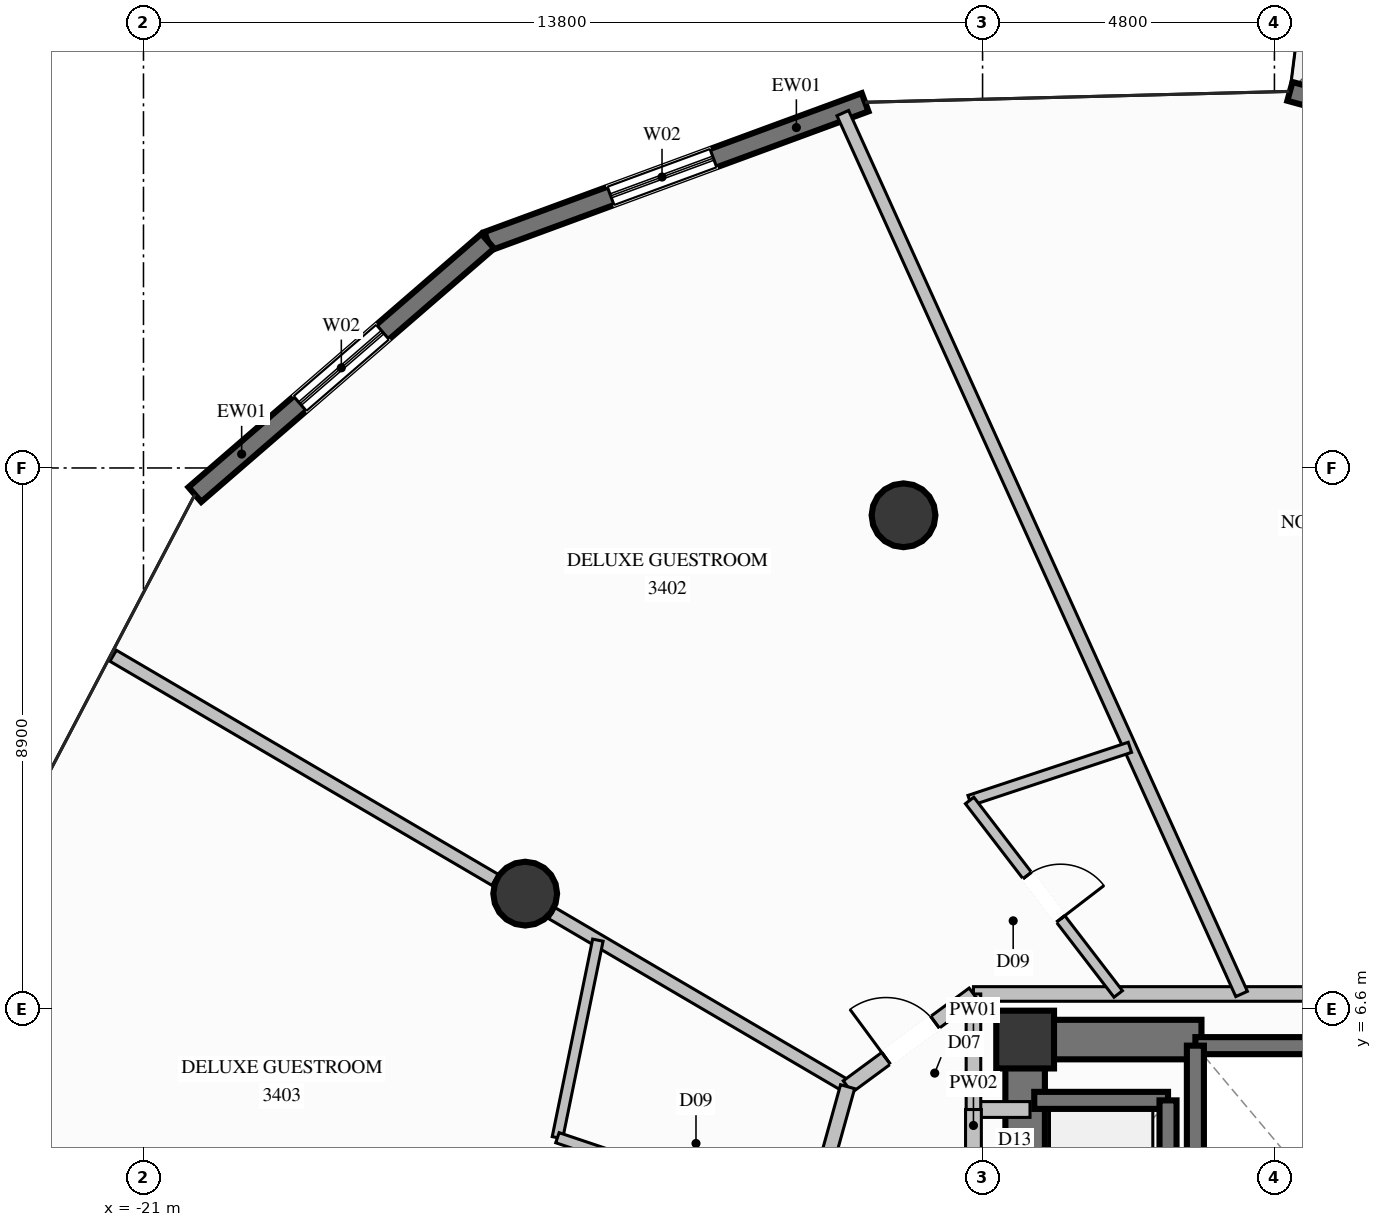
"""IFC4 building model, lengths in metres.
Left out: names, types, materials, properties, quantities, classifications, styles, units other than length and angle.
Written with IfcOpenShell. Run it as: python <this file> out.ifc"""

import sys

from ifc_helpers import new_model, si_unit, direction, frame, frame_2d, origin, origin_2d, place, context, subcontext, project, spatial, rectangle, circle, extrude, element, fill, save


model = new_model("IFC4")
c1 = context("Model", 3, precision=1e-05, world=origin(), true_north=direction((0.0, 1.0)))
c2 = subcontext(c1, "Body", "Model", "MODEL_VIEW")
j1 = project(units=[si_unit("LENGTHUNIT", "METRE"), si_unit("PLANEANGLEUNIT", "RADIAN")], contexts=[c1])
p1 = place(None, origin())
s1 = spatial("IfcSite", under=j1, at=p1, CompositionType="ELEMENT")
p2 = place(p1, origin())
s2 = spatial("IfcBuilding", under=s1, at=p2, CompositionType="ELEMENT")
p3 = place(p2, frame((0.0, 0.0, 127.8)))
s3 = spatial("IfcBuildingStorey", under=s2, at=p3, CompositionType="ELEMENT", Elevation=127.8)
p4 = place(p3, frame((-6.5, 6.1, 0.0), z_axis=(0.0, 0.0, 1.0), x_axis=(1.0, 0.0, 0.0)))
e1 = element("IfcColumn", 1, at=p4, inside=s3, PredefinedType="COLUMN", context=c2, shape_type="SweptSolid", body=[
    extrude(rectangle(XDim=0.95, YDim=0.95, at=origin_2d()), origin(), (0.0, 0.0, 1.0), 3.6),
])
p5 = place(p3, frame((-6.175, 6.1, 0.0), z_axis=(0.0, 0.0, 1.0), x_axis=(1.0, 0.0, 0.0)))
e2 = element("IfcWall", 2, at=p5, inside=s3, PredefinedType="SHEAR", context=c2, shape_type="SweptSolid", body=[
    extrude(rectangle(XDim=2.575, YDim=0.65, at=frame_2d((1.288, 0.0))), origin(), (0.0, 0.0, 1.0), 3.6),
])
p6 = place(p3, frame((-6.5, 2.35, 0.0), z_axis=(0.0, 0.0, 1.0), x_axis=(0.0, 1.0, 0.0)))
e3 = element("IfcWall", 3, at=p6, inside=s3, PredefinedType="SHEAR", context=c2, shape_type="SweptSolid", body=[
    extrude(rectangle(XDim=4.075, YDim=0.65, at=frame_2d((2.038, 0.0))), origin(), (0.0, 0.0, 1.0), 3.6),
])
for number, where, z_axis, x_axis in (
    (4, (-8.5, 14.722, 0.0), (0.0, 0.0, 1.0), (1.0, 0.0, 0.0)),
    (5, (-14.722, 8.5, 0.0), (0.0, 0.0, 1.0), (1.0, 0.0, 0.0)),
):
    element("IfcColumn", number, at=place(p3, frame(where, z_axis=z_axis, x_axis=x_axis)), inside=s3, PredefinedType="COLUMN", context=c2, shape_type="SweptSolid", body=[
        extrude(circle(Radius=0.525, at=origin_2d()), origin(), (0.0, 0.0, 1.0), 3.6),
    ])
p7 = place(p3, frame((-2.145, 21.693, 0.0), z_axis=(0.0, 0.0, 1.0), x_axis=(0.964319993606, -0.264739400036, 0.0)))
e6 = element("IfcWall", 6, at=p7, inside=s3, PredefinedType="SOLIDWALL", context=c2, shape_type="SweptSolid", body=[
    extrude(rectangle(XDim=7.347, YDim=0.32, at=frame_2d((3.674, 0.0))), origin(), (0.0, 0.0, 1.0), 3.35),
])
p8 = place(p7, frame((2.774, 0.0, 0.35)))
e7 = element("IfcOpeningElement", 7, at=p8, cuts=e6, PredefinedType="OPENING", context=c2, shape_type="SweptSolid", body=[
    extrude(rectangle(XDim=1.8, YDim=2.6, at=frame_2d((0.9, 1.3))), frame((0.0, 0.17, 0.0), z_axis=(0.0, -1.0, 0.0), x_axis=(1.0, 0.0, 0.0)), (0.0, 0.0, 1.0), 0.34),
])
p9 = place(p3, frame((-15.338, 19.23, 0.0), z_axis=(0.0, 0.0, 1.0), x_axis=(0.938461564884, 0.345383686986, 0.0)))
e8 = element("IfcWall", 8, at=p9, inside=s3, PredefinedType="SOLIDWALL", context=c2, shape_type="SweptSolid", body=[
    extrude(rectangle(XDim=6.613, YDim=0.32, at=frame_2d((3.306, 0.0))), origin(), (0.0, 0.0, 1.0), 3.35),
])
p10 = place(p9, frame((2.154, 0.0, 0.35)))
e9 = element("IfcOpeningElement", 9, at=p10, cuts=e8, PredefinedType="OPENING", context=c2, shape_type="SweptSolid", body=[
    extrude(rectangle(XDim=1.8, YDim=2.6, at=frame_2d((0.9, 1.3))), frame((0.0, 0.17, 0.0), z_axis=(0.0, -1.0, 0.0), x_axis=(1.0, 0.0, 0.0)), (0.0, 0.0, 1.0), 0.34),
])
p11 = place(p3, frame((-20.155, 15.063, 0.0), z_axis=(0.0, 0.0, 1.0), x_axis=(0.756299610366, 0.654225419377, 0.0)))
e10 = element("IfcWall", 10, at=p11, inside=s3, PredefinedType="SOLIDWALL", context=c2, shape_type="SweptSolid", body=[
    extrude(rectangle(XDim=6.369, YDim=0.32, at=frame_2d((3.185, 0.0))), origin(), (0.0, 0.0, 1.0), 3.35),
])
p12 = place(p11, frame((2.285, 0.0, 0.35)))
e11 = element("IfcOpeningElement", 11, at=p12, cuts=e10, PredefinedType="OPENING", context=c2, shape_type="SweptSolid", body=[
    extrude(rectangle(XDim=1.8, YDim=2.6, at=frame_2d((0.9, 1.3))), frame((0.0, 0.17, 0.0), z_axis=(0.0, -1.0, 0.0), x_axis=(1.0, 0.0, 0.0)), (0.0, 0.0, 1.0), 0.34),
])
p13 = place(p3, frame((-1.6, 6.0, 0.0), z_axis=(0.0, 0.0, 1.0), x_axis=(-1.0, 0.0, 0.0)))
e12 = element("IfcWall", 12, at=p13, inside=s3, PredefinedType="SOLIDWALL", context=c2, shape_type="SweptSolid", body=[
    extrude(rectangle(XDim=2.1, YDim=0.28, at=frame_2d((1.05, 0.0))), origin(), (0.0, 0.0, 1.0), 3.35),
])
p14 = place(p3, frame((-3.7, 6.0, 0.0), z_axis=(0.0, 0.0, 1.0), x_axis=(0.0, -1.0, 0.0)))
e13 = element("IfcWall", 13, at=p14, inside=s3, PredefinedType="SOLIDWALL", context=c2, shape_type="SweptSolid", body=[
    extrude(rectangle(XDim=2.5, YDim=0.28, at=frame_2d((1.25, 0.0))), origin(), (0.0, 0.0, 1.0), 3.35),
])
p15 = place(p3, frame((-4.15, 5.1, 0.0), z_axis=(0.0, 0.0, 1.0), x_axis=(-1.0, 0.0, 0.0)))
e14 = element("IfcWall", 14, at=p15, inside=s3, PredefinedType="SOLIDWALL", context=c2, shape_type="SweptSolid", body=[
    extrude(rectangle(XDim=2.2, YDim=0.28, at=frame_2d((1.1, 0.0))), origin(), (0.0, 0.0, 1.0), 3.35),
])
p16 = place(p3, frame((-4.15, 2.4, 0.0), z_axis=(0.0, 0.0, 1.0), x_axis=(0.0, 1.0, 0.0)))
e15 = element("IfcWall", 15, at=p16, inside=s3, PredefinedType="SOLIDWALL", context=c2, shape_type="SweptSolid", body=[
    extrude(rectangle(XDim=2.7, YDim=0.28, at=frame_2d((1.35, 0.0))), origin(), (0.0, 0.0, 1.0), 3.35),
])
p17 = place(p3, frame((-7.35, 4.95, 0.0), z_axis=(0.0, 0.0, 1.0), x_axis=(1.0, 0.0, 0.0)))
e16 = element("IfcWall", 16, at=p17, inside=s3, PredefinedType="PARTITIONING", context=c2, shape_type="SweptSolid", body=[
    extrude(rectangle(XDim=0.93, YDim=0.26, at=frame_2d((0.465, 0.0))), origin(), (0.0, 0.0, 1.0), 3.35),
])
p18 = place(p3, frame((-7.35, 2.55, 0.0), z_axis=(0.0, 0.0, 1.0), x_axis=(0.0, 1.0, 0.0)))
e17 = element("IfcWall", 17, at=p18, inside=s3, PredefinedType="PARTITIONING", context=c2, shape_type="SweptSolid", body=[
    extrude(rectangle(XDim=2.4, YDim=0.26, at=frame_2d((1.2, 0.0))), origin(), (0.0, 0.0, 1.0), 2.435),
])
p19 = place(p18, frame((0.775, 0.0, 0.0)))
e18 = element("IfcOpeningElement", 18, at=p19, cuts=e17, PredefinedType="OPENING", context=c2, shape_type="SweptSolid", body=[
    extrude(rectangle(XDim=0.85, YDim=2.05, at=frame_2d((0.425, 1.025))), frame((0.0, 0.14, 0.0), z_axis=(0.0, -1.0, 0.0), x_axis=(1.0, 0.0, 0.0)), (0.0, 0.0, 1.0), 0.28),
])
p20 = place(p3, frame((-7.35, 6.85, 0.0), z_axis=(0.0, 0.0, 1.0), x_axis=(1.0, 0.0, 0.0)))
e19 = element("IfcWall", 19, at=p20, inside=s3, PredefinedType="PARTITIONING", context=c2, shape_type="SweptSolid", body=[
    extrude(rectangle(XDim=14.7, YDim=0.24, at=frame_2d((7.35, 0.0))), origin(), (0.0, 0.0, 1.0), 2.435),
])
p21 = place(p3, frame((-7.35, 4.95, 0.0), z_axis=(0.0, 0.0, 1.0), x_axis=(0.0, 1.0, 0.0)))
e20 = element("IfcWall", 20, at=p21, inside=s3, PredefinedType="PARTITIONING", context=c2, shape_type="SweptSolid", body=[
    extrude(rectangle(XDim=1.9, YDim=0.24, at=frame_2d((0.95, 0.0))), origin(), (0.0, 0.0, 1.0), 2.435),
])
p22 = place(p3, frame((-9.42, 5.325, 0.0), z_axis=(0.0, 0.0, 1.0), x_axis=(-0.862477017481, 0.506096230293, 0.0)))
e21 = element("IfcWall", 21, at=p22, inside=s3, PredefinedType="PARTITIONING", context=c2, shape_type="SweptSolid", body=[
    extrude(rectangle(XDim=5.637, YDim=0.21, at=frame_2d((2.819, 0.0))), origin(), (0.0, 0.0, 1.0), 2.717),
])
p23 = place(p3, frame((-15.218, 8.727, 0.0), z_axis=(0.0, 0.0, 1.0), x_axis=(-0.862512809527, 0.506035229409, 0.0)))
e22 = element("IfcWall", 22, at=p23, inside=s3, PredefinedType="PARTITIONING", context=c2, shape_type="SweptSolid", body=[
    extrude(rectangle(XDim=7.282, YDim=0.21, at=frame_2d((3.641, 0.0))), origin(), (0.0, 0.0, 1.0), 3.35),
])
p24 = place(p3, frame((-2.94, 6.85, 0.0), z_axis=(0.0, 0.0, 1.0), x_axis=(-0.412479187099, 0.910967024765, 0.0)))
e23 = element("IfcWall", 23, at=p24, inside=s3, PredefinedType="PARTITIONING", context=c2, shape_type="SweptSolid", body=[
    extrude(rectangle(XDim=15.902, YDim=0.21, at=frame_2d((7.951, 0.0))), origin(), (0.0, 0.0, 1.0), 3.35),
])
p25 = place(p3, frame((-7.413, 10.032, 0.0), z_axis=(0.0, 0.0, 1.0), x_axis=(0.949183203982, 0.314724078008, 0.0)))
e24 = element("IfcWall", 24, at=p25, inside=s3, PredefinedType="PLUMBINGWALL", context=c2, shape_type="SweptSolid", body=[
    extrude(rectangle(XDim=2.777, YDim=0.175, at=frame_2d((1.389, 0.0))), origin(), (0.0, 0.0, 1.0), 3.35),
])
p26 = place(p3, frame((-7.413, 10.032, 0.0), z_axis=(0.0, 0.0, 1.0), x_axis=(0.609160709833, -0.793046801643, 0.0)))
e25 = element("IfcWall", 25, at=p26, inside=s3, PredefinedType="PLUMBINGWALL", context=c2, shape_type="SweptSolid", body=[
    extrude(rectangle(XDim=4.012, YDim=0.175, at=frame_2d((2.006, 0.0))), origin(), (0.0, 0.0, 1.0), 2.717),
])
p27 = place(p26, frame((1.556, 0.0, 0.0)))
e26 = element("IfcOpeningElement", 26, at=p27, cuts=e25, PredefinedType="OPENING", context=c2, shape_type="SweptSolid", body=[
    extrude(rectangle(XDim=0.9, YDim=2.1, at=frame_2d((0.45, 1.05))), frame((0.0, 0.098, 0.0), z_axis=(0.0, -1.0, 0.0), x_axis=(1.0, 0.0, 0.0)), (0.0, 0.0, 1.0), 0.195),
])
p28 = place(p3, frame((-9.42, 5.325, 0.0), z_axis=(0.0, 0.0, 1.0), x_axis=(0.805053450612, 0.593202277185, 0.0)))
e27 = element("IfcWall", 27, at=p28, inside=s3, PredefinedType="PARTITIONING", context=c2, shape_type="SweptSolid", body=[
    extrude(rectangle(XDim=2.571, YDim=0.24, at=frame_2d((1.286, 0.0))), origin(), (0.0, 0.0, 1.0), 3.35),
])
p29 = place(p28, frame((0.786, 0.0, 0.0)))
e28 = element("IfcOpeningElement", 28, at=p29, cuts=e27, PredefinedType="OPENING", context=c2, shape_type="SweptSolid", body=[
    extrude(rectangle(XDim=1.0, YDim=2.2, at=frame_2d((0.5, 1.1))), frame((0.0, 0.13, 0.0), z_axis=(0.0, -1.0, 0.0), x_axis=(1.0, 0.0, 0.0)), (0.0, 0.0, 1.0), 0.26),
])
p30 = place(p3, frame((-9.42, 5.325, 0.0), z_axis=(0.0, 0.0, 1.0), x_axis=(-0.268045342481, -0.963406297662, 0.0)))
e29 = element("IfcWall", 29, at=p30, inside=s3, PredefinedType="PARTITIONING", context=c2, shape_type="SweptSolid", body=[
    extrude(rectangle(XDim=2.321, YDim=0.24, at=frame_2d((1.16, 0.0))), origin(), (0.0, 0.0, 1.0), 3.35),
])
p31 = place(p3, frame((-13.527, 7.735, 0.0), z_axis=(0.0, 0.0, 1.0), x_axis=(-0.200460473107, -0.979701790711, 0.0)))
e30 = element("IfcWall", 30, at=p31, inside=s3, PredefinedType="PLUMBINGWALL", context=c2, shape_type="SweptSolid", body=[
    extrude(rectangle(XDim=3.316, YDim=0.175, at=frame_2d((1.658, 0.0))), origin(), (0.0, 0.0, 1.0), 3.35),
])
p32 = place(p3, frame((-10.042, 3.089, 0.0), z_axis=(0.0, 0.0, 1.0), x_axis=(-0.947742433388, 0.319036486872, 0.0)))
e31 = element("IfcWall", 31, at=p32, inside=s3, PredefinedType="PLUMBINGWALL", context=c2, shape_type="SweptSolid", body=[
    extrude(rectangle(XDim=4.379, YDim=0.175, at=frame_2d((2.189, 0.0))), origin(), (0.0, 0.0, 1.0), 3.35),
])
p33 = place(p32, frame((1.739, 0.0, 0.0)))
e32 = element("IfcOpeningElement", 32, at=p33, cuts=e31, PredefinedType="OPENING", context=c2, shape_type="SweptSolid", body=[
    extrude(rectangle(XDim=0.9, YDim=2.1, at=frame_2d((0.45, 1.05))), frame((0.0, 0.098, 0.0), z_axis=(0.0, -1.0, 0.0), x_axis=(1.0, 0.0, 0.0)), (0.0, 0.0, 1.0), 0.195),
])
p34 = place(p10, origin())
e33 = element("IfcWindow", 33, at=p34, inside=s3, PartitioningType="SINGLE_PANEL", PredefinedType="WINDOW", context=c2, shape_type="SweptSolid", body=[
    extrude(rectangle(XDim=1.8, YDim=2.6, at=frame_2d((0.9, 1.3))), frame((0.0, 0.03, 0.0), z_axis=(0.0, -1.0, 0.0), x_axis=(1.0, 0.0, 0.0)), (0.0, 0.0, 1.0), 0.06),
])
fill(e9, e33)
p35 = place(p12, origin())
e34 = element("IfcWindow", 34, at=p35, inside=s3, PartitioningType="SINGLE_PANEL", PredefinedType="WINDOW", context=c2, shape_type="SweptSolid", body=[
    extrude(rectangle(XDim=1.8, YDim=2.6, at=frame_2d((0.9, 1.3))), frame((0.0, 0.03, 0.0), z_axis=(0.0, -1.0, 0.0), x_axis=(1.0, 0.0, 0.0)), (0.0, 0.0, 1.0), 0.06),
])
fill(e11, e34)
p36 = place(p27, origin())
e35 = element("IfcDoor", 35, at=p36, inside=s3, OperationType="SINGLE_SWING_RIGHT", PredefinedType="DOOR", context=c2, shape_type="SweptSolid", body=[
    extrude(rectangle(XDim=0.9, YDim=2.1, at=frame_2d((0.45, 1.05))), frame((0.0, 0.025, 0.0), z_axis=(0.0, -1.0, 0.0), x_axis=(1.0, 0.0, 0.0)), (0.0, 0.0, 1.0), 0.05),
])
fill(e26, e35)
p37 = place(p29, origin())
e36 = element("IfcDoor", 36, at=p37, inside=s3, OperationType="SINGLE_SWING_LEFT", PredefinedType="DOOR", context=c2, shape_type="SweptSolid", body=[
    extrude(rectangle(XDim=1.0, YDim=2.2, at=frame_2d((0.5, 1.1))), frame((0.0, 0.025, 0.0), z_axis=(0.0, -1.0, 0.0), x_axis=(1.0, 0.0, 0.0)), (0.0, 0.0, 1.0), 0.05),
])
fill(e28, e36)
save(model, sys.argv[1])
